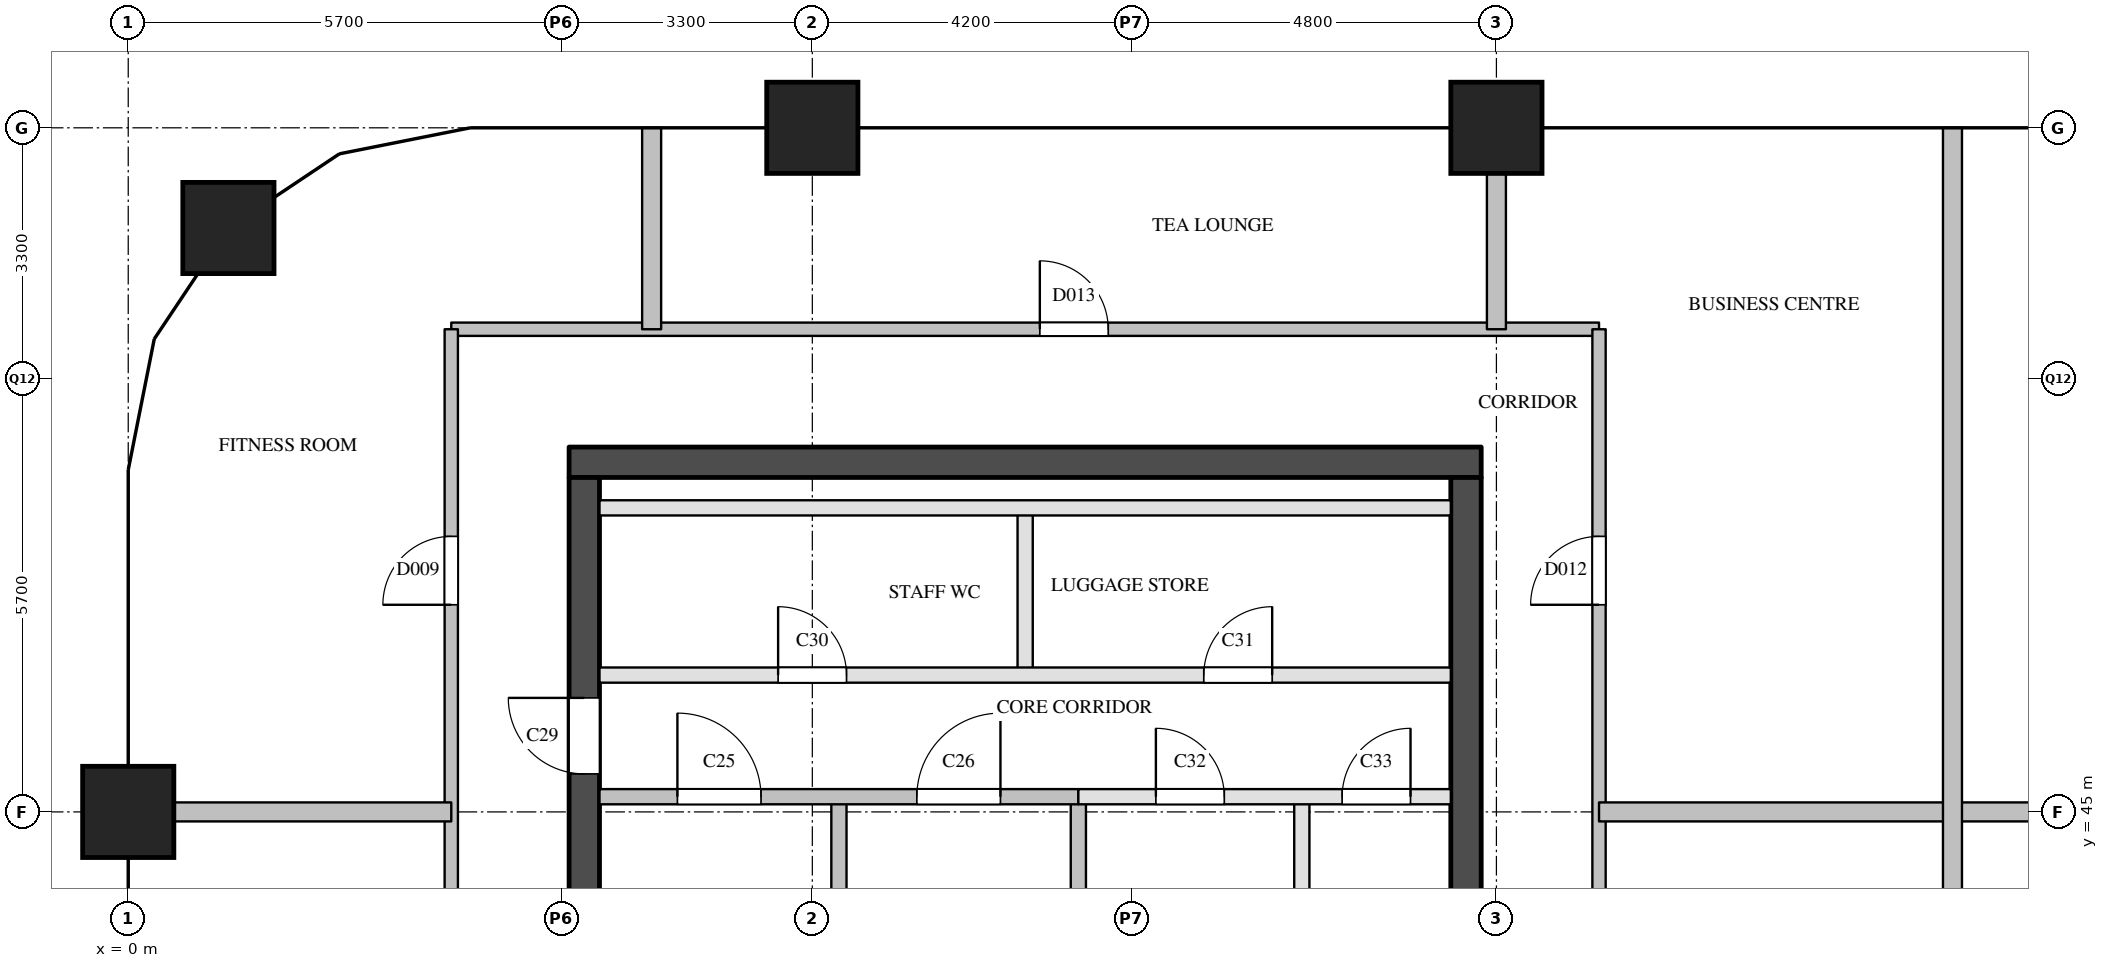
"""IFC4 building model, lengths in metres.
Left out: names, types, materials, properties, quantities, classifications, styles, units other than length and angle.
Written with IfcOpenShell. Run it as: python <this file> out.ifc"""

import sys

from ifc_helpers import new_model, si_unit, direction, frame, frame_2d, origin, origin_2d, place, context, subcontext, project, spatial, rectangle, extrude, element, fill, save


model = new_model("IFC4")
c1 = context("Model", 3, precision=1e-05, world=origin(), true_north=direction((0.0, 1.0)))
c2 = subcontext(c1, "Body", "Model", "MODEL_VIEW")
j1 = project(units=[si_unit("LENGTHUNIT", "METRE"), si_unit("PLANEANGLEUNIT", "RADIAN")], contexts=[c1])
p1 = place(None, origin())
s1 = spatial("IfcSite", under=j1, at=p1, CompositionType="ELEMENT")
p2 = place(p1, origin())
s2 = spatial("IfcBuilding", under=s1, at=p2, CompositionType="ELEMENT")
p3 = place(p2, frame((0.0, 0.0, 226.7)))
s3 = spatial("IfcBuildingStorey", under=s2, at=p3, CompositionType="ELEMENT", Elevation=226.7)
for number, where, z_axis, x_axis in (
    (1, (0.0, 45.0, 0.0), (0.0, 0.0, 1.0), (1.0, 0.0, 0.0)),
    (2, (1.318, 52.682, 0.0), (0.0, 0.0, 1.0), (1.0, 0.0, 0.0)),
    (3, (9.0, 54.0, 0.0), (0.0, 0.0, 1.0), (1.0, 0.0, 0.0)),
    (4, (18.0, 54.0, 0.0), (0.0, 0.0, 1.0), (1.0, 0.0, 0.0)),
):
    element("IfcColumn", number, at=place(p3, frame(where, z_axis=z_axis, x_axis=x_axis)), inside=s3, PredefinedType="COLUMN", context=c2, shape_type="SweptSolid", body=[
        extrude(rectangle(XDim=1.2, YDim=1.2, at=origin_2d()), origin(), (0.0, 0.0, 1.0), 3.9),
    ])
p4 = place(p3, frame((5.8, 49.6, 0.0), z_axis=(0.0, 0.0, 1.0), x_axis=(1.0, 0.0, 0.0)))
e5 = element("IfcWall", 5, at=p4, inside=s3, PredefinedType="SHEAR", context=c2, shape_type="SweptSolid", body=[
    extrude(rectangle(XDim=12.0, YDim=0.4, at=frame_2d((6.0, 0.0))), origin(), (0.0, 0.0, 1.0), 3.5),
])
p5 = place(p3, frame((6.0, 29.1, 0.0), z_axis=(0.0, 0.0, 1.0), x_axis=(0.0, 1.0, 0.0)))
e6 = element("IfcWall", 6, at=p5, inside=s3, PredefinedType="SHEAR", context=c2, shape_type="SweptSolid", body=[
    extrude(rectangle(XDim=20.3, YDim=0.4, at=frame_2d((10.15, 0.0))), origin(), (0.0, 0.0, 1.0), 3.5),
])
p6 = place(p5, frame((3.45, 0.0, 0.0)))
e7 = element("IfcOpeningElement", 7, at=p6, cuts=e6, PredefinedType="OPENING", context=c2, shape_type="SweptSolid", body=[
    extrude(rectangle(XDim=1.0, YDim=2.1, at=frame_2d((0.5, 1.05))), frame((0.0, 0.21, 0.0), z_axis=(0.0, -1.0, 0.0), x_axis=(1.0, 0.0, 0.0)), (0.0, 0.0, 1.0), 0.42),
])
p7 = place(p5, frame((16.4, 0.0, 0.0)))
e8 = element("IfcOpeningElement", 8, at=p7, cuts=e6, PredefinedType="OPENING", context=c2, shape_type="SweptSolid", body=[
    extrude(rectangle(XDim=1.0, YDim=2.1, at=frame_2d((0.5, 1.05))), frame((0.0, 0.21, 0.0), z_axis=(0.0, -1.0, 0.0), x_axis=(1.0, 0.0, 0.0)), (0.0, 0.0, 1.0), 0.42),
])
p8 = place(p3, frame((17.6, 29.1, 0.0), z_axis=(0.0, 0.0, 1.0), x_axis=(0.0, 1.0, 0.0)))
e9 = element("IfcWall", 9, at=p8, inside=s3, PredefinedType="SHEAR", context=c2, shape_type="SweptSolid", body=[
    extrude(rectangle(XDim=20.3, YDim=0.4, at=frame_2d((10.15, 0.0))), origin(), (0.0, 0.0, 1.0), 3.5),
])
p9 = place(p8, frame((1.25, 0.0, 0.0)))
e10 = element("IfcOpeningElement", 10, at=p9, cuts=e9, PredefinedType="OPENING", context=c2, shape_type="SweptSolid", body=[
    extrude(rectangle(XDim=0.7, YDim=2.1, at=frame_2d((0.35, 1.05))), frame((0.0, 0.21, 0.0), z_axis=(0.0, -1.0, 0.0), x_axis=(1.0, 0.0, 0.0)), (0.0, 0.0, 1.0), 0.42),
])
p10 = place(p8, frame((8.3, 0.0, 0.0)))
e11 = element("IfcOpeningElement", 11, at=p10, cuts=e9, PredefinedType="OPENING", context=c2, shape_type="SweptSolid", body=[
    extrude(rectangle(XDim=0.7, YDim=2.1, at=frame_2d((0.35, 1.05))), frame((0.0, 0.21, 0.0), z_axis=(0.0, -1.0, 0.0), x_axis=(1.0, 0.0, 0.0)), (0.0, 0.0, 1.0), 0.42),
])
p11 = place(p8, frame((3.6, 0.0, 0.0)))
e12 = element("IfcOpeningElement", 12, at=p11, cuts=e9, PredefinedType="OPENING", context=c2, shape_type="SweptSolid", body=[
    extrude(rectangle(XDim=1.8, YDim=2.1, at=frame_2d((0.9, 1.05))), frame((0.0, 0.21, 0.0), z_axis=(0.0, -1.0, 0.0), x_axis=(1.0, 0.0, 0.0)), (0.0, 0.0, 1.0), 0.42),
])
p12 = place(p3, frame((9.35, 40.9, 0.0), z_axis=(0.0, 0.0, 1.0), x_axis=(0.0, 1.0, 0.0)))
e13 = element("IfcWall", 13, at=p12, inside=s3, PredefinedType="SOLIDWALL", context=c2, shape_type="SweptSolid", body=[
    extrude(rectangle(XDim=4.3, YDim=0.2, at=frame_2d((2.15, 0.0))), origin(), (0.0, 0.0, 1.0), 3.5),
])
p13 = place(p3, frame((11.8, 46.8, 0.0), z_axis=(0.0, 0.0, 1.0), x_axis=(0.0, 1.0, 0.0)))
e14 = element("IfcWall", 14, at=p13, inside=s3, PredefinedType="PARTITIONING", context=c2, shape_type="SweptSolid", body=[
    extrude(rectangle(XDim=2.2, YDim=0.2, at=frame_2d((1.1, 0.0))), origin(), (0.0, 0.0, 1.0), 3.5),
])
p14 = place(p3, frame((12.5, 40.9, 0.0), z_axis=(0.0, 0.0, 1.0), x_axis=(0.0, 1.0, 0.0)))
e15 = element("IfcWall", 15, at=p14, inside=s3, PredefinedType="SOLIDWALL", context=c2, shape_type="SweptSolid", body=[
    extrude(rectangle(XDim=4.3, YDim=0.2, at=frame_2d((2.15, 0.0))), origin(), (0.0, 0.0, 1.0), 3.5),
])
p15 = place(p3, frame((15.44, 39.0, 0.0), z_axis=(0.0, 0.0, 1.0), x_axis=(0.0, 1.0, 0.0)))
e16 = element("IfcWall", 16, at=p15, inside=s3, PredefinedType="PARTITIONING", context=c2, shape_type="SweptSolid", body=[
    extrude(rectangle(XDim=6.2, YDim=0.2, at=frame_2d((3.1, 0.0))), origin(), (0.0, 0.0, 1.0), 3.5),
])
p16 = place(p3, frame((12.5, 45.2, 0.0), z_axis=(0.0, 0.0, 1.0), x_axis=(1.0, 0.0, 0.0)))
e17 = element("IfcWall", 17, at=p16, inside=s3, PredefinedType="PARTITIONING", context=c2, shape_type="SweptSolid", body=[
    extrude(rectangle(XDim=4.9, YDim=0.2, at=frame_2d((2.45, 0.0))), origin(), (0.0, 0.0, 1.0), 3.5),
])
p17 = place(p16, frame((1.02, 0.0, 0.0)))
e18 = element("IfcOpeningElement", 18, at=p17, cuts=e17, PredefinedType="OPENING", context=c2, shape_type="SweptSolid", body=[
    extrude(rectangle(XDim=0.9, YDim=2.1, at=frame_2d((0.45, 1.05))), frame((0.0, 0.11, 0.0), z_axis=(0.0, -1.0, 0.0), x_axis=(1.0, 0.0, 0.0)), (0.0, 0.0, 1.0), 0.22),
])
p18 = place(p16, frame((3.47, 0.0, 0.0)))
e19 = element("IfcOpeningElement", 19, at=p18, cuts=e17, PredefinedType="OPENING", context=c2, shape_type="SweptSolid", body=[
    extrude(rectangle(XDim=0.9, YDim=2.1, at=frame_2d((0.45, 1.05))), frame((0.0, 0.11, 0.0), z_axis=(0.0, -1.0, 0.0), x_axis=(1.0, 0.0, 0.0)), (0.0, 0.0, 1.0), 0.22),
])
p19 = place(p3, frame((6.2, 45.2, 0.0), z_axis=(0.0, 0.0, 1.0), x_axis=(1.0, 0.0, 0.0)))
e20 = element("IfcWall", 20, at=p19, inside=s3, PredefinedType="SOLIDWALL", context=c2, shape_type="SweptSolid", body=[
    extrude(rectangle(XDim=6.3, YDim=0.2, at=frame_2d((3.15, 0.0))), origin(), (0.0, 0.0, 1.0), 3.5),
])
p20 = place(p19, frame((1.025, 0.0, 0.0)))
e21 = element("IfcOpeningElement", 21, at=p20, cuts=e20, PredefinedType="OPENING", context=c2, shape_type="SweptSolid", body=[
    extrude(rectangle(XDim=1.1, YDim=2.1, at=frame_2d((0.55, 1.05))), frame((0.0, 0.11, 0.0), z_axis=(0.0, -1.0, 0.0), x_axis=(1.0, 0.0, 0.0)), (0.0, 0.0, 1.0), 0.22),
])
p21 = place(p19, frame((4.175, 0.0, 0.0)))
e22 = element("IfcOpeningElement", 22, at=p21, cuts=e20, PredefinedType="OPENING", context=c2, shape_type="SweptSolid", body=[
    extrude(rectangle(XDim=1.1, YDim=2.1, at=frame_2d((0.55, 1.05))), frame((0.0, 0.11, 0.0), z_axis=(0.0, -1.0, 0.0), x_axis=(1.0, 0.0, 0.0)), (0.0, 0.0, 1.0), 0.22),
])
p22 = place(p3, frame((6.2, 46.8, 0.0), z_axis=(0.0, 0.0, 1.0), x_axis=(1.0, 0.0, 0.0)))
e23 = element("IfcWall", 23, at=p22, inside=s3, PredefinedType="PARTITIONING", context=c2, shape_type="SweptSolid", body=[
    extrude(rectangle(XDim=11.2, YDim=0.2, at=frame_2d((5.6, 0.0))), origin(), (0.0, 0.0, 1.0), 3.5),
])
p23 = place(p22, frame((2.35, 0.0, 0.0)))
e24 = element("IfcOpeningElement", 24, at=p23, cuts=e23, PredefinedType="OPENING", context=c2, shape_type="SweptSolid", body=[
    extrude(rectangle(XDim=0.9, YDim=2.1, at=frame_2d((0.45, 1.05))), frame((0.0, 0.11, 0.0), z_axis=(0.0, -1.0, 0.0), x_axis=(1.0, 0.0, 0.0)), (0.0, 0.0, 1.0), 0.22),
])
p24 = place(p22, frame((7.95, 0.0, 0.0)))
e25 = element("IfcOpeningElement", 25, at=p24, cuts=e23, PredefinedType="OPENING", context=c2, shape_type="SweptSolid", body=[
    extrude(rectangle(XDim=0.9, YDim=2.1, at=frame_2d((0.45, 1.05))), frame((0.0, 0.11, 0.0), z_axis=(0.0, -1.0, 0.0), x_axis=(1.0, 0.0, 0.0)), (0.0, 0.0, 1.0), 0.22),
])
p25 = place(p3, frame((6.2, 49.0, 0.0), z_axis=(0.0, 0.0, 1.0), x_axis=(1.0, 0.0, 0.0)))
e26 = element("IfcWall", 26, at=p25, inside=s3, PredefinedType="PARTITIONING", context=c2, shape_type="SweptSolid", body=[
    extrude(rectangle(XDim=11.2, YDim=0.2, at=frame_2d((5.6, 0.0))), origin(), (0.0, 0.0, 1.0), 3.5),
])
p26 = place(p3, frame((4.25, 51.35, 0.0), z_axis=(0.0, 0.0, 1.0), x_axis=(1.0, 0.0, 0.0)))
e27 = element("IfcWall", 27, at=p26, inside=s3, PredefinedType="PARTITIONING", context=c2, shape_type="SweptSolid", body=[
    extrude(rectangle(XDim=15.1, YDim=0.175, at=frame_2d((7.55, 0.0))), origin(), (0.0, 0.0, 1.0), 3.5),
])
p27 = place(p26, frame((7.743, 0.0, 0.0)))
e28 = element("IfcOpeningElement", 28, at=p27, cuts=e27, PredefinedType="OPENING", context=c2, shape_type="SweptSolid", body=[
    extrude(rectangle(XDim=0.9, YDim=2.1, at=frame_2d((0.45, 1.05))), frame((0.0, 0.097, 0.0), z_axis=(0.0, -1.0, 0.0), x_axis=(1.0, 0.0, 0.0)), (0.0, 0.0, 1.0), 0.195),
])
p28 = place(p3, frame((4.25, 28.5, 0.0), z_axis=(0.0, 0.0, 1.0), x_axis=(0.0, 1.0, 0.0)))
e29 = element("IfcWall", 29, at=p28, inside=s3, PredefinedType="PARTITIONING", context=c2, shape_type="SweptSolid", body=[
    extrude(rectangle(XDim=22.85, YDim=0.175, at=frame_2d((11.425, 0.0))), origin(), (0.0, 0.0, 1.0), 3.5),
])
p29 = place(p28, frame((3.3, 0.0, 0.0)))
e30 = element("IfcOpeningElement", 30, at=p29, cuts=e29, PredefinedType="OPENING", context=c2, shape_type="SweptSolid", body=[
    extrude(rectangle(XDim=0.9, YDim=2.1, at=frame_2d((0.45, 1.05))), frame((0.0, 0.097, 0.0), z_axis=(0.0, -1.0, 0.0), x_axis=(1.0, 0.0, 0.0)), (0.0, 0.0, 1.0), 0.195),
])
p30 = place(p28, frame((11.55, 0.0, 0.0)))
e31 = element("IfcOpeningElement", 31, at=p30, cuts=e29, PredefinedType="OPENING", context=c2, shape_type="SweptSolid", body=[
    extrude(rectangle(XDim=0.9, YDim=2.1, at=frame_2d((0.45, 1.05))), frame((0.0, 0.097, 0.0), z_axis=(0.0, -1.0, 0.0), x_axis=(1.0, 0.0, 0.0)), (0.0, 0.0, 1.0), 0.195),
])
p31 = place(p28, frame((19.225, 0.0, 0.0)))
e32 = element("IfcOpeningElement", 32, at=p31, cuts=e29, PredefinedType="OPENING", context=c2, shape_type="SweptSolid", body=[
    extrude(rectangle(XDim=0.9, YDim=2.1, at=frame_2d((0.45, 1.05))), frame((0.0, 0.097, 0.0), z_axis=(0.0, -1.0, 0.0), x_axis=(1.0, 0.0, 0.0)), (0.0, 0.0, 1.0), 0.195),
])
p32 = place(p3, frame((19.35, 28.5, 0.0), z_axis=(0.0, 0.0, 1.0), x_axis=(0.0, 1.0, 0.0)))
e33 = element("IfcWall", 33, at=p32, inside=s3, PredefinedType="PARTITIONING", context=c2, shape_type="SweptSolid", body=[
    extrude(rectangle(XDim=22.85, YDim=0.175, at=frame_2d((11.425, 0.0))), origin(), (0.0, 0.0, 1.0), 3.5),
])
p33 = place(p32, frame((3.3, 0.0, 0.0)))
e34 = element("IfcOpeningElement", 34, at=p33, cuts=e33, PredefinedType="OPENING", context=c2, shape_type="SweptSolid", body=[
    extrude(rectangle(XDim=0.9, YDim=2.1, at=frame_2d((0.45, 1.05))), frame((0.0, 0.097, 0.0), z_axis=(0.0, -1.0, 0.0), x_axis=(1.0, 0.0, 0.0)), (0.0, 0.0, 1.0), 0.195),
])
p34 = place(p32, frame((11.5, 0.0, 0.0)))
e35 = element("IfcOpeningElement", 35, at=p34, cuts=e33, PredefinedType="OPENING", context=c2, shape_type="SweptSolid", body=[
    extrude(rectangle(XDim=1.0, YDim=2.1, at=frame_2d((0.5, 1.05))), frame((0.0, 0.097, 0.0), z_axis=(0.0, -1.0, 0.0), x_axis=(1.0, 0.0, 0.0)), (0.0, 0.0, 1.0), 0.195),
])
p35 = place(p32, frame((19.225, 0.0, 0.0)))
e36 = element("IfcOpeningElement", 36, at=p35, cuts=e33, PredefinedType="OPENING", context=c2, shape_type="SweptSolid", body=[
    extrude(rectangle(XDim=0.9, YDim=2.1, at=frame_2d((0.45, 1.05))), frame((0.0, 0.097, 0.0), z_axis=(0.0, -1.0, 0.0), x_axis=(1.0, 0.0, 0.0)), (0.0, 0.0, 1.0), 0.195),
])
p36 = place(p3, frame((0.0, 45.0, 0.0), z_axis=(0.0, 0.0, 1.0), x_axis=(1.0, 0.0, 0.0)))
e37 = element("IfcWall", 37, at=p36, inside=s3, PredefinedType="PARTITIONING", context=c2, shape_type="SweptSolid", body=[
    extrude(rectangle(XDim=4.25, YDim=0.25, at=frame_2d((2.125, 0.0))), origin(), (0.0, 0.0, 1.0), 3.5),
])
p37 = place(p3, frame((19.35, 45.0, 0.0), z_axis=(0.0, 0.0, 1.0), x_axis=(1.0, 0.0, 0.0)))
e38 = element("IfcWall", 38, at=p37, inside=s3, PredefinedType="PARTITIONING", context=c2, shape_type="SweptSolid", body=[
    extrude(rectangle(XDim=15.3, YDim=0.25, at=frame_2d((7.65, 0.0))), origin(), (0.0, 0.0, 1.0), 3.5),
])
p38 = place(p3, frame((6.886, 51.35, 0.0), z_axis=(0.0, 0.0, 1.0), x_axis=(0.0, 1.0, 0.0)))
e39 = element("IfcWall", 39, at=p38, inside=s3, PredefinedType="PARTITIONING", context=c2, shape_type="SweptSolid", body=[
    extrude(rectangle(XDim=2.65, YDim=0.25, at=frame_2d((1.325, 0.0))), origin(), (0.0, 0.0, 1.0), 2.5),
])
p39 = place(p3, frame((18.0, 51.35, 0.0), z_axis=(0.0, 0.0, 1.0), x_axis=(0.0, 1.0, 0.0)))
e40 = element("IfcWall", 40, at=p39, inside=s3, PredefinedType="PARTITIONING", context=c2, shape_type="SweptSolid", body=[
    extrude(rectangle(XDim=2.65, YDim=0.25, at=frame_2d((1.325, 0.0))), origin(), (0.0, 0.0, 1.0), 3.5),
])
p40 = place(p3, frame((24.0, 27.0, 0.0), z_axis=(0.0, 0.0, 1.0), x_axis=(0.0, 1.0, 0.0)))
e41 = element("IfcWall", 41, at=p40, inside=s3, PredefinedType="PARTITIONING", context=c2, shape_type="SweptSolid", body=[
    extrude(rectangle(XDim=27.0, YDim=0.25, at=frame_2d((13.5, 0.0))), origin(), (0.0, 0.0, 1.0), 3.5),
])
p41 = place(p20, origin())
e42 = element("IfcDoor", 42, at=p41, inside=s3, OperationType="SINGLE_SWING_LEFT", PredefinedType="DOOR", context=c2, shape_type="SweptSolid", body=[
    extrude(rectangle(XDim=1.1, YDim=2.1, at=frame_2d((0.55, 1.05))), frame((0.0, 0.025, 0.0), z_axis=(0.0, -1.0, 0.0), x_axis=(1.0, 0.0, 0.0)), (0.0, 0.0, 1.0), 0.05),
])
fill(e21, e42)
p42 = place(p21, origin())
e43 = element("IfcDoor", 43, at=p42, inside=s3, OperationType="SINGLE_SWING_RIGHT", PredefinedType="DOOR", context=c2, shape_type="SweptSolid", body=[
    extrude(rectangle(XDim=1.1, YDim=2.1, at=frame_2d((0.55, 1.05))), frame((0.0, 0.025, 0.0), z_axis=(0.0, -1.0, 0.0), x_axis=(1.0, 0.0, 0.0)), (0.0, 0.0, 1.0), 0.05),
])
fill(e22, e43)
p43 = place(p7, origin())
e44 = element("IfcDoor", 44, at=p43, inside=s3, OperationType="SINGLE_SWING_RIGHT", PredefinedType="DOOR", context=c2, shape_type="SweptSolid", body=[
    extrude(rectangle(XDim=1.0, YDim=2.1, at=frame_2d((0.5, 1.05))), frame((0.0, 0.025, 0.0), z_axis=(0.0, -1.0, 0.0), x_axis=(1.0, 0.0, 0.0)), (0.0, 0.0, 1.0), 0.05),
])
fill(e8, e44)
p44 = place(p23, origin())
e45 = element("IfcDoor", 45, at=p44, inside=s3, OperationType="SINGLE_SWING_LEFT", PredefinedType="DOOR", context=c2, shape_type="SweptSolid", body=[
    extrude(rectangle(XDim=0.9, YDim=2.1, at=frame_2d((0.45, 1.05))), frame((0.0, 0.025, 0.0), z_axis=(0.0, -1.0, 0.0), x_axis=(1.0, 0.0, 0.0)), (0.0, 0.0, 1.0), 0.05),
])
fill(e24, e45)
p45 = place(p24, origin())
e46 = element("IfcDoor", 46, at=p45, inside=s3, OperationType="SINGLE_SWING_RIGHT", PredefinedType="DOOR", context=c2, shape_type="SweptSolid", body=[
    extrude(rectangle(XDim=0.9, YDim=2.1, at=frame_2d((0.45, 1.05))), frame((0.0, 0.025, 0.0), z_axis=(0.0, -1.0, 0.0), x_axis=(1.0, 0.0, 0.0)), (0.0, 0.0, 1.0), 0.05),
])
fill(e25, e46)
p46 = place(p17, origin())
e47 = element("IfcDoor", 47, at=p46, inside=s3, OperationType="SINGLE_SWING_LEFT", PredefinedType="DOOR", context=c2, shape_type="SweptSolid", body=[
    extrude(rectangle(XDim=0.9, YDim=2.1, at=frame_2d((0.45, 1.05))), frame((0.0, 0.025, 0.0), z_axis=(0.0, -1.0, 0.0), x_axis=(1.0, 0.0, 0.0)), (0.0, 0.0, 1.0), 0.05),
])
fill(e18, e47)
p47 = place(p18, origin())
e48 = element("IfcDoor", 48, at=p47, inside=s3, OperationType="SINGLE_SWING_RIGHT", PredefinedType="DOOR", context=c2, shape_type="SweptSolid", body=[
    extrude(rectangle(XDim=0.9, YDim=2.1, at=frame_2d((0.45, 1.05))), frame((0.0, 0.025, 0.0), z_axis=(0.0, -1.0, 0.0), x_axis=(1.0, 0.0, 0.0)), (0.0, 0.0, 1.0), 0.05),
])
fill(e19, e48)
p48 = place(p31, origin())
e49 = element("IfcDoor", 49, at=p48, inside=s3, OperationType="SINGLE_SWING_LEFT", PredefinedType="DOOR", context=c2, shape_type="SweptSolid", body=[
    extrude(rectangle(XDim=0.9, YDim=2.1, at=frame_2d((0.45, 1.05))), frame((0.0, 0.025, 0.0), z_axis=(0.0, -1.0, 0.0), x_axis=(1.0, 0.0, 0.0)), (0.0, 0.0, 1.0), 0.05),
])
fill(e32, e49)
p49 = place(p35, origin())
e50 = element("IfcDoor", 50, at=p49, inside=s3, OperationType="SINGLE_SWING_LEFT", PredefinedType="DOOR", context=c2, shape_type="SweptSolid", body=[
    extrude(rectangle(XDim=0.9, YDim=2.1, at=frame_2d((0.45, 1.05))), frame((0.0, 0.025, 0.0), z_axis=(0.0, -1.0, 0.0), x_axis=(1.0, 0.0, 0.0)), (0.0, 0.0, 1.0), 0.05),
])
fill(e36, e50)
p50 = place(p27, origin())
e51 = element("IfcDoor", 51, at=p50, inside=s3, OperationType="SINGLE_SWING_LEFT", PredefinedType="DOOR", context=c2, shape_type="SweptSolid", body=[
    extrude(rectangle(XDim=0.9, YDim=2.1, at=frame_2d((0.45, 1.05))), frame((0.0, 0.025, 0.0), z_axis=(0.0, -1.0, 0.0), x_axis=(1.0, 0.0, 0.0)), (0.0, 0.0, 1.0), 0.05),
])
fill(e28, e51)
save(model, sys.argv[1])
